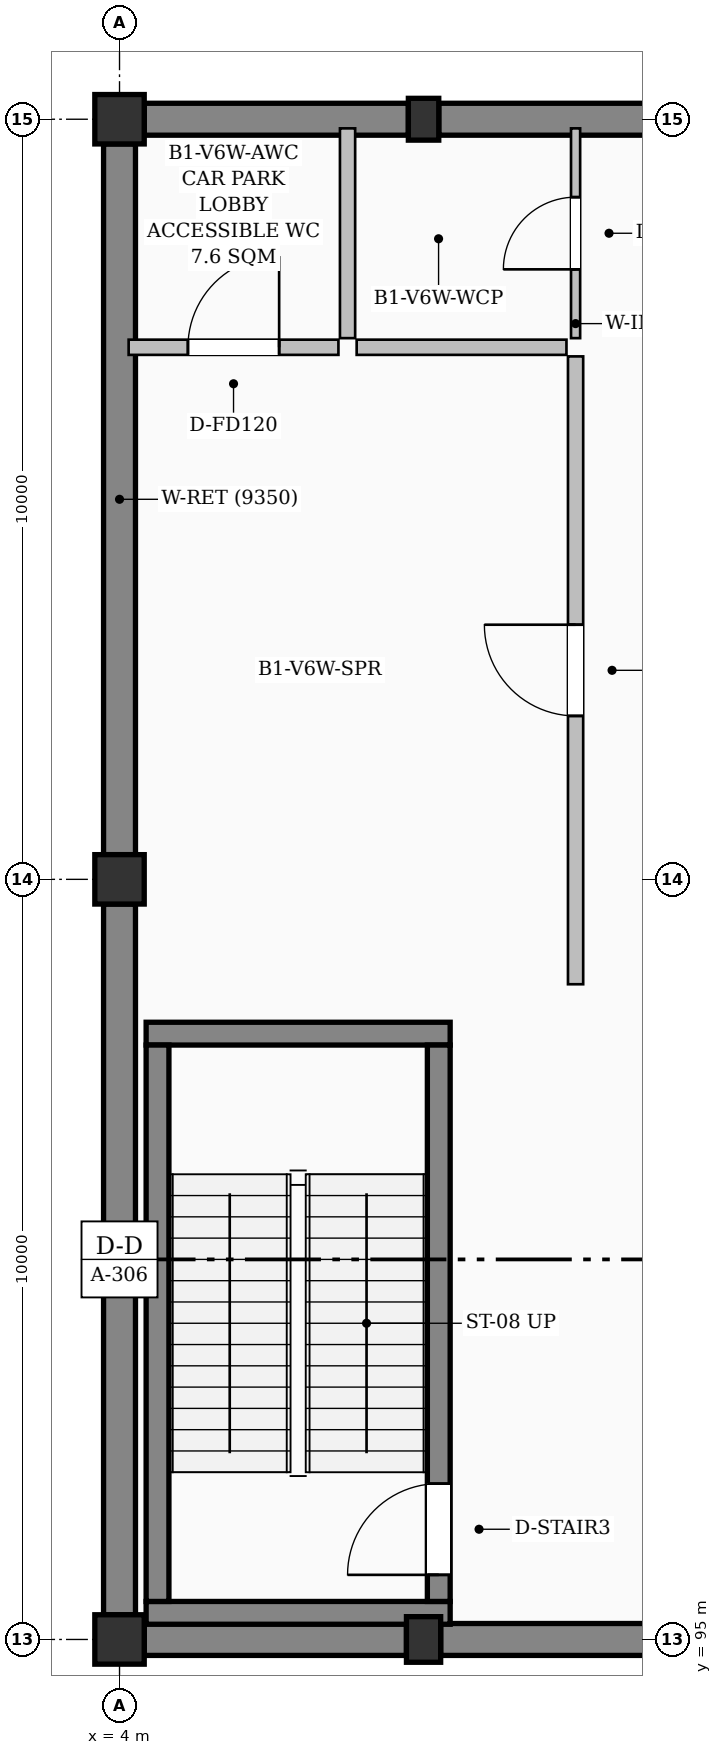
"""IFC4 building model, lengths in metres.
Left out: names, types, materials, properties, quantities, classifications, styles, units other than length and angle.
Written with IfcOpenShell. Run it as: python <this file> out.ifc"""

import sys

from ifc_helpers import new_model, si_unit, direction, frame, frame_2d, origin, origin_2d, place, context, subcontext, project, spatial, rectangle, extrude, element, fill, save


model = new_model("IFC4")
c1 = context("Model", 3, precision=1e-05, world=origin(), true_north=direction((0.0, 1.0)))
c2 = subcontext(c1, "Body", "Model", "MODEL_VIEW")
j1 = project(units=[si_unit("LENGTHUNIT", "METRE"), si_unit("PLANEANGLEUNIT", "RADIAN")], contexts=[c1])
p1 = place(None, origin())
s1 = spatial("IfcSite", under=j1, at=p1, CompositionType="ELEMENT")
p2 = place(p1, origin())
s2 = spatial("IfcBuilding", under=s1, at=p2, CompositionType="ELEMENT")
p3 = place(p2, frame((0.0, 0.0, -4.8)))
s3 = spatial("IfcBuildingStorey", under=s2, at=p3, CompositionType="ELEMENT", Elevation=-4.8)
for number, where, z_axis, x_axis in (
    (1, (4.0, 95.0, -0.38), (0.0, 0.0, 1.0), (1.0, 0.0, 0.0)),
    (2, (4.0, 105.0, -0.38), (0.0, 0.0, 1.0), (1.0, 0.0, 0.0)),
    (3, (4.0, 115.0, -0.38), (0.0, 0.0, 1.0), (1.0, 0.0, 0.0)),
):
    element("IfcColumn", number, at=place(p3, frame(where, z_axis=z_axis, x_axis=x_axis)), inside=s3, PredefinedType="COLUMN", context=c2, shape_type="SweptSolid", body=[
        extrude(rectangle(XDim=0.65, YDim=0.65, at=origin_2d()), origin(), (0.0, 0.0, 1.0), 5.18),
    ])
p4 = place(p3, frame((8.0, 95.0, -0.38), z_axis=(0.0, 0.0, 1.0), x_axis=(1.0, 0.0, 0.0)))
e4 = element("IfcColumn", 4, at=p4, inside=s3, PredefinedType="PILASTER", context=c2, shape_type="SweptSolid", body=[
    extrude(rectangle(XDim=0.45, YDim=0.6, at=origin_2d()), origin(), (0.0, 0.0, 1.0), 5.18),
])
p5 = place(p3, frame((8.0, 115.0, -0.38), z_axis=(0.0, 0.0, 1.0), x_axis=(1.0, 0.0, 0.0)))
e5 = element("IfcColumn", 5, at=p5, inside=s3, PredefinedType="PILASTER", context=c2, shape_type="SweptSolid", body=[
    extrude(rectangle(XDim=0.4, YDim=0.55, at=origin_2d()), origin(), (0.0, 0.0, 1.0), 5.18),
])
for number, where, z_axis, x_axis in (
    (6, (4.0, 95.325, 0.0), (0.0, 0.0, 1.0), (0.0, 1.0, 0.0)),
    (7, (4.0, 105.325, 0.0), (0.0, 0.0, 1.0), (0.0, 1.0, 0.0)),
):
    element("IfcWall", number, at=place(p3, frame(where, z_axis=z_axis, x_axis=x_axis)), inside=s3, PredefinedType="USERDEFINED", context=c2, shape_type="SweptSolid", body=[
        extrude(rectangle(XDim=9.35, YDim=0.42, at=frame_2d((4.675, 0.0))), origin(), (0.0, 0.0, 1.0), 3.85),
    ])
for number, where, z_axis, x_axis in (
    (8, (4.325, 115.0, 0.0), (0.0, 0.0, 1.0), (1.0, 0.0, 0.0)),
    (9, (8.2, 115.0, 0.0), (0.0, 0.0, 1.0), (1.0, 0.0, 0.0)),
):
    element("IfcWall", number, at=place(p3, frame(where, z_axis=z_axis, x_axis=x_axis)), inside=s3, PredefinedType="USERDEFINED", context=c2, shape_type="SweptSolid", body=[
        extrude(rectangle(XDim=3.475, YDim=0.42, at=frame_2d((1.738, 0.0))), origin(), (0.0, 0.0, 1.0), 3.85),
    ])
for number, where, z_axis, x_axis in (
    (10, (11.675, 95.0, 0.0), (0.0, 0.0, 1.0), (-1.0, 0.0, 0.0)),
    (11, (7.775, 95.0, 0.0), (0.0, 0.0, 1.0), (-1.0, 0.0, 0.0)),
):
    element("IfcWall", number, at=place(p3, frame(where, z_axis=z_axis, x_axis=x_axis)), inside=s3, PredefinedType="USERDEFINED", context=c2, shape_type="SweptSolid", body=[
        extrude(rectangle(XDim=3.45, YDim=0.42, at=frame_2d((1.725, 0.0))), origin(), (0.0, 0.0, 1.0), 3.85),
    ])
for number, where, z_axis, x_axis in (
    (12, (4.35, 95.35, -0.38), (0.0, 0.0, 1.0), (1.0, 0.0, 0.0)),
    (13, (8.35, 102.97, -0.38), (0.0, 0.0, 1.0), (-1.0, 0.0, 0.0)),
):
    element("IfcWall", number, at=place(p3, frame(where, z_axis=z_axis, x_axis=x_axis)), inside=s3, PredefinedType="SHEAR", context=c2, shape_type="SweptSolid", body=[
        extrude(rectangle(XDim=4.0, YDim=0.3, at=frame_2d((2.0, 0.0))), origin(), (0.0, 0.0, 1.0), 4.84),
    ])
p6 = place(p3, frame((4.5, 95.5, -0.38), z_axis=(0.0, 0.0, 1.0), x_axis=(0.0, 1.0, 0.0)))
e14 = element("IfcWall", 14, at=p6, inside=s3, PredefinedType="SHEAR", context=c2, shape_type="SweptSolid", body=[
    extrude(rectangle(XDim=7.32, YDim=0.3, at=frame_2d((3.66, 0.0))), origin(), (0.0, 0.0, 1.0), 4.84),
])
p7 = place(p3, frame((8.2, 95.5, -0.38), z_axis=(0.0, 0.0, 1.0), x_axis=(0.0, 1.0, 0.0)))
e15 = element("IfcWall", 15, at=p7, inside=s3, PredefinedType="SHEAR", context=c2, shape_type="SweptSolid", body=[
    extrude(rectangle(XDim=7.32, YDim=0.3, at=frame_2d((3.66, 0.0))), origin(), (0.0, 0.0, 1.0), 4.84),
])
p8 = place(p7, frame((0.35, 0.0, 0.38)))
e16 = element("IfcOpeningElement", 16, at=p8, cuts=e15, PredefinedType="OPENING", context=c2, shape_type="SweptSolid", body=[
    extrude(rectangle(XDim=1.2, YDim=2.15, at=frame_2d((0.6, 1.075))), frame((0.0, 0.16, 0.0), z_axis=(0.0, -1.0, 0.0), x_axis=(1.0, 0.0, 0.0)), (0.0, 0.0, 1.0), 0.32),
])
p9 = place(p3, frame((10.0, 103.62, 0.0), z_axis=(0.0, 0.0, 1.0), x_axis=(0.0, 1.0, 0.0)))
e17 = element("IfcWall", 17, at=p9, inside=s3, PredefinedType="PARTITIONING", context=c2, shape_type="SweptSolid", body=[
    extrude(rectangle(XDim=8.26, YDim=0.2, at=frame_2d((4.13, 0.0))), origin(), (0.0, 0.0, 1.0), 4.46),
])
p10 = place(p9, frame((3.53, 0.0, 0.0)))
e18 = element("IfcOpeningElement", 18, at=p10, cuts=e17, PredefinedType="OPENING", context=c2, shape_type="SweptSolid", body=[
    extrude(rectangle(XDim=1.2, YDim=2.2, at=frame_2d((0.6, 1.1))), frame((0.0, 0.11, 0.0), z_axis=(0.0, -1.0, 0.0), x_axis=(1.0, 0.0, 0.0)), (0.0, 0.0, 1.0), 0.22),
])
p11 = place(p3, frame((10.0, 112.12, 0.0), z_axis=(0.0, 0.0, 1.0), x_axis=(0.0, 1.0, 0.0)))
e19 = element("IfcWall", 19, at=p11, inside=s3, PredefinedType="PARTITIONING", context=c2, shape_type="SweptSolid", body=[
    extrude(rectangle(XDim=2.76, YDim=0.12, at=frame_2d((1.38, 0.0))), origin(), (0.0, 0.0, 1.0), 4.46),
])
p12 = place(p11, frame((0.905, 0.0, 0.0)))
e20 = element("IfcOpeningElement", 20, at=p12, cuts=e19, PredefinedType="OPENING", context=c2, shape_type="SweptSolid", body=[
    extrude(rectangle(XDim=0.95, YDim=2.1, at=frame_2d((0.475, 1.05))), frame((0.0, 0.07, 0.0), z_axis=(0.0, -1.0, 0.0), x_axis=(1.0, 0.0, 0.0)), (0.0, 0.0, 1.0), 0.14),
])
p13 = place(p3, frame((4.12, 112.0, 0.0), z_axis=(0.0, 0.0, 1.0), x_axis=(1.0, 0.0, 0.0)))
e21 = element("IfcWall", 21, at=p13, inside=s3, PredefinedType="PARTITIONING", context=c2, shape_type="SweptSolid", body=[
    extrude(rectangle(XDim=2.76, YDim=0.2, at=frame_2d((1.38, 0.0))), origin(), (0.0, 0.0, 1.0), 4.115),
])
p14 = place(p13, frame((0.78, 0.0, 0.0)))
e22 = element("IfcOpeningElement", 22, at=p14, cuts=e21, PredefinedType="OPENING", context=c2, shape_type="SweptSolid", body=[
    extrude(rectangle(XDim=1.2, YDim=2.2, at=frame_2d((0.6, 1.1))), frame((0.0, 0.11, 0.0), z_axis=(0.0, -1.0, 0.0), x_axis=(1.0, 0.0, 0.0)), (0.0, 0.0, 1.0), 0.22),
])
p15 = place(p3, frame((7.12, 112.0, 0.0), z_axis=(0.0, 0.0, 1.0), x_axis=(1.0, 0.0, 0.0)))
e23 = element("IfcWall", 23, at=p15, inside=s3, PredefinedType="PARTITIONING", context=c2, shape_type="SweptSolid", body=[
    extrude(rectangle(XDim=2.76, YDim=0.2, at=frame_2d((1.38, 0.0))), origin(), (0.0, 0.0, 1.0), 4.115),
])
p16 = place(p3, frame((7.0, 112.12, 0.0), z_axis=(0.0, 0.0, 1.0), x_axis=(0.0, 1.0, 0.0)))
e24 = element("IfcWall", 24, at=p16, inside=s3, PredefinedType="PARTITIONING", context=c2, shape_type="SweptSolid", body=[
    extrude(rectangle(XDim=2.76, YDim=0.2, at=frame_2d((1.38, 0.0))), origin(), (0.0, 0.0, 1.0), 4.46),
])
p17 = place(p8, origin())
e25 = element("IfcDoor", 25, at=p17, inside=s3, OperationType="SINGLE_SWING_LEFT", PredefinedType="DOOR", context=c2, shape_type="SweptSolid", body=[
    extrude(rectangle(XDim=1.2, YDim=2.15, at=frame_2d((0.6, 1.075))), frame((0.0, 0.025, 0.0), z_axis=(0.0, -1.0, 0.0), x_axis=(1.0, 0.0, 0.0)), (0.0, 0.0, 1.0), 0.05),
])
fill(e16, e25)
p18 = place(p10, origin())
e26 = element("IfcDoor", 26, at=p18, inside=s3, OperationType="SINGLE_SWING_RIGHT", PredefinedType="DOOR", context=c2, shape_type="SweptSolid", body=[
    extrude(rectangle(XDim=1.2, YDim=2.2, at=frame_2d((0.6, 1.1))), frame((0.0, 0.025, 0.0), z_axis=(0.0, -1.0, 0.0), x_axis=(1.0, 0.0, 0.0)), (0.0, 0.0, 1.0), 0.05),
])
fill(e18, e26)
p19 = place(p12, origin())
e27 = element("IfcDoor", 27, at=p19, inside=s3, OperationType="SINGLE_SWING_LEFT", PredefinedType="DOOR", context=c2, shape_type="SweptSolid", body=[
    extrude(rectangle(XDim=0.95, YDim=2.1, at=frame_2d((0.475, 1.05))), frame((0.0, 0.025, 0.0), z_axis=(0.0, -1.0, 0.0), x_axis=(1.0, 0.0, 0.0)), (0.0, 0.0, 1.0), 0.05),
])
fill(e20, e27)
p20 = place(p14, origin())
e28 = element("IfcDoor", 28, at=p20, inside=s3, OperationType="SINGLE_SWING_RIGHT", PredefinedType="DOOR", context=c2, shape_type="SweptSolid", body=[
    extrude(rectangle(XDim=1.2, YDim=2.2, at=frame_2d((0.6, 1.1))), frame((0.0, 0.025, 0.0), z_axis=(0.0, -1.0, 0.0), x_axis=(1.0, 0.0, 0.0)), (0.0, 0.0, 1.0), 0.05),
])
fill(e22, e28)
save(model, sys.argv[1])
